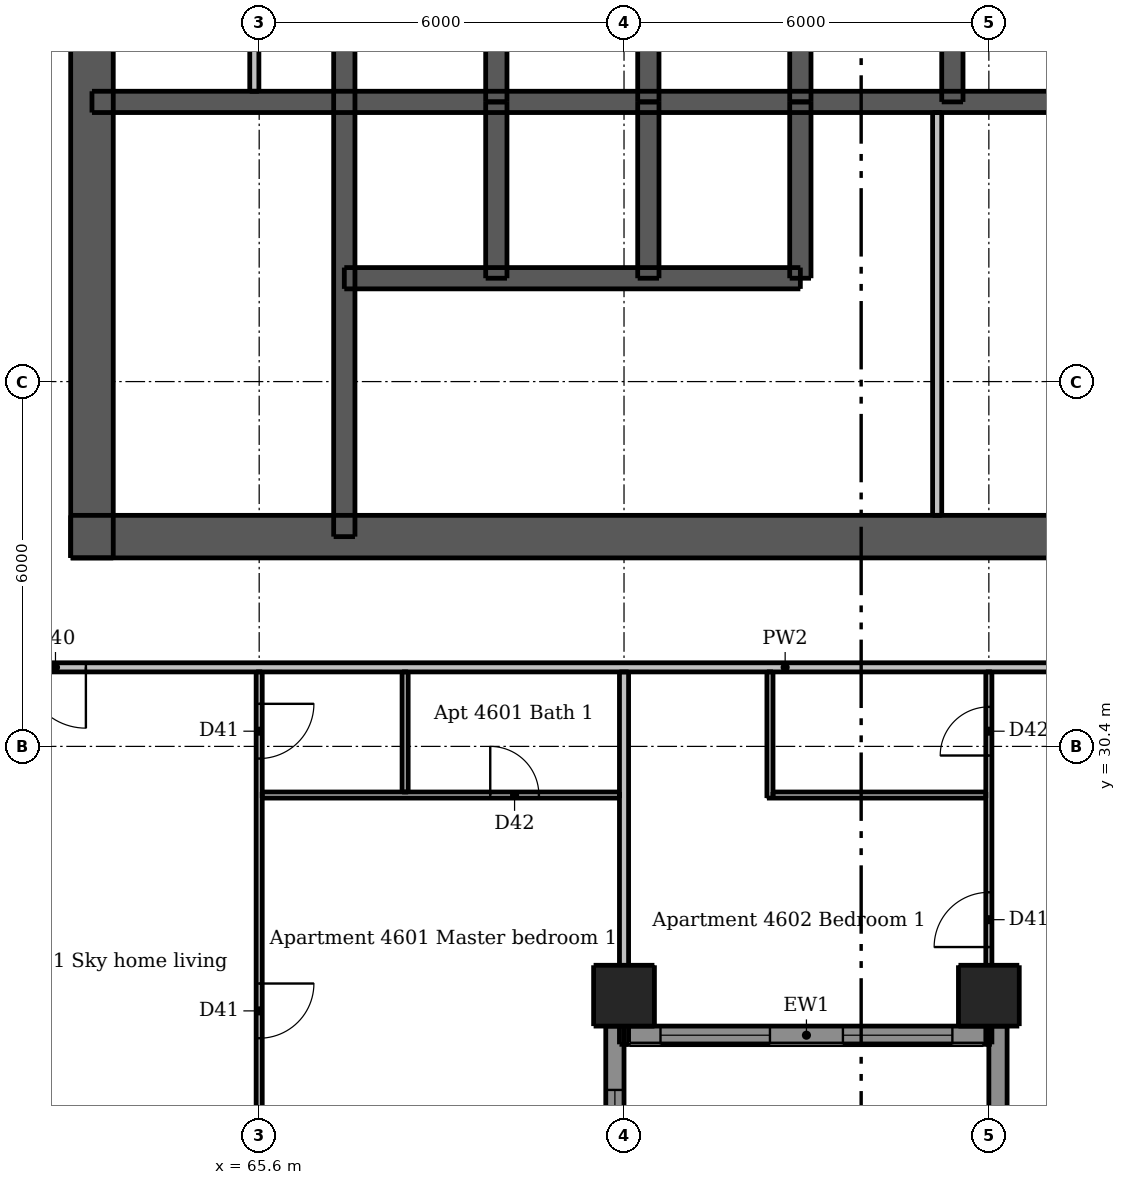
"""IFC4 building model, lengths in metres.
Left out: names, types, materials, properties, quantities, classifications, styles, units other than length and angle.
Written with IfcOpenShell. Run it as: python <this file> out.ifc"""

import sys

from ifc_helpers import new_model, si_unit, direction, frame, frame_2d, origin, origin_2d, place, context, subcontext, project, spatial, rectangle, extrude, element, fill, save


model = new_model("IFC4")
c1 = context("Model", 3, precision=1e-05, world=origin(), true_north=direction((0.0, 1.0)))
c2 = subcontext(c1, "Body", "Model", "MODEL_VIEW")
j1 = project(units=[si_unit("LENGTHUNIT", "METRE"), si_unit("PLANEANGLEUNIT", "RADIAN")], contexts=[c1])
p1 = place(None, origin())
s1 = spatial("IfcSite", under=j1, at=p1, CompositionType="ELEMENT")
p2 = place(p1, origin())
s2 = spatial("IfcBuilding", under=s1, at=p2, CompositionType="ELEMENT")
p3 = place(p2, frame((0.0, 0.0, 171.4)))
s3 = spatial("IfcBuildingStorey", under=s2, at=p3, CompositionType="ELEMENT", Elevation=171.4)
p4 = place(p3, frame((62.5, 33.85, 0.0), z_axis=(0.0, 0.0, 1.0), x_axis=(1.0, 0.0, 0.0)))
e1 = element("IfcWall", 1, at=p4, inside=s3, PredefinedType="SHEAR", context=c2, shape_type="SweptSolid", body=[
    extrude(rectangle(XDim=24.0, YDim=0.7, at=frame_2d((12.0, 0.0))), origin(), (0.0, 0.0, 1.0), 3.05),
])
p5 = place(p4, frame((1.962, 0.0, 0.0)))
e2 = element("IfcOpeningElement", 2, at=p5, cuts=e1, PredefinedType="OPENING", context=c2, shape_type="SweptSolid", body=[
    extrude(rectangle(XDim=1.1, YDim=2.1, at=frame_2d((0.55, 1.05))), frame((0.0, 0.36, 0.0), z_axis=(0.0, -1.0, 0.0), x_axis=(1.0, 0.0, 0.0)), (0.0, 0.0, 1.0), 0.72),
])
p6 = place(p4, frame((20.938, 0.0, 0.0)))
e3 = element("IfcOpeningElement", 3, at=p6, cuts=e1, PredefinedType="OPENING", context=c2, shape_type="SweptSolid", body=[
    extrude(rectangle(XDim=1.1, YDim=2.1, at=frame_2d((0.55, 1.05))), frame((0.0, 0.36, 0.0), z_axis=(0.0, -1.0, 0.0), x_axis=(1.0, 0.0, 0.0)), (0.0, 0.0, 1.0), 0.72),
])
p7 = place(p4, frame((8.0, 0.0, 0.0)))
e4 = element("IfcOpeningElement", 4, at=p7, cuts=e1, PredefinedType="OPENING", context=c2, shape_type="SweptSolid", body=[
    extrude(rectangle(XDim=1.1, YDim=2.1, at=frame_2d((0.55, 1.05))), frame((0.0, 0.36, 0.0), z_axis=(0.0, -1.0, 0.0), x_axis=(1.0, 0.0, 0.0)), (0.0, 0.0, 1.0), 0.72),
])
p8 = place(p4, frame((16.375, 0.0, 0.0)))
e5 = element("IfcOpeningElement", 5, at=p8, cuts=e1, PredefinedType="OPENING", context=c2, shape_type="SweptSolid", body=[
    extrude(rectangle(XDim=0.9, YDim=2.1, at=frame_2d((0.45, 1.05))), frame((0.0, 0.36, 0.0), z_axis=(0.0, -1.0, 0.0), x_axis=(1.0, 0.0, 0.0)), (0.0, 0.0, 1.0), 0.72),
])
p9 = place(p3, frame((62.85, 33.5, 0.0), z_axis=(0.0, 0.0, 1.0), x_axis=(0.0, 1.0, 0.0)))
e6 = element("IfcWall", 6, at=p9, inside=s3, PredefinedType="SHEAR", context=c2, shape_type="SweptSolid", body=[
    extrude(rectangle(XDim=24.0, YDim=0.7, at=frame_2d((12.0, 0.0))), origin(), (0.0, 0.0, 1.0), 3.05),
])
p10 = place(p9, frame((11.2, 0.0, 0.0)))
e7 = element("IfcOpeningElement", 7, at=p10, cuts=e6, PredefinedType="OPENING", context=c2, shape_type="SweptSolid", body=[
    extrude(rectangle(XDim=1.6, YDim=2.1, at=frame_2d((0.8, 1.05))), frame((0.0, 0.36, 0.0), z_axis=(0.0, -1.0, 0.0), x_axis=(1.0, 0.0, 0.0)), (0.0, 0.0, 1.0), 0.72),
])
p11 = place(p3, frame((62.85, 41.0, 0.0), z_axis=(0.0, 0.0, 1.0), x_axis=(1.0, 0.0, 0.0)))
e8 = element("IfcWall", 8, at=p11, inside=s3, PredefinedType="SHEAR", context=c2, shape_type="SweptSolid", body=[
    extrude(rectangle(XDim=23.3, YDim=0.35, at=frame_2d((11.65, 0.0))), origin(), (0.0, 0.0, 1.0), 3.05),
])
p12 = place(p3, frame((67.0, 33.85, 0.0), z_axis=(0.0, 0.0, 1.0), x_axis=(0.0, 1.0, 0.0)))
e9 = element("IfcWall", 9, at=p12, inside=s3, PredefinedType="SHEAR", context=c2, shape_type="SweptSolid", body=[
    extrude(rectangle(XDim=10.05, YDim=0.35, at=frame_2d((5.025, 0.0))), origin(), (0.0, 0.0, 1.0), 3.05),
])
p13 = place(p12, frame((0.55, 0.0, 0.0)))
e10 = element("IfcOpeningElement", 10, at=p13, cuts=e9, PredefinedType="OPENING", context=c2, shape_type="SweptSolid", body=[
    extrude(rectangle(XDim=1.1, YDim=2.1, at=frame_2d((0.55, 1.05))), frame((0.0, 0.185, 0.0), z_axis=(0.0, -1.0, 0.0), x_axis=(1.0, 0.0, 0.0)), (0.0, 0.0, 1.0), 0.37),
])
for number, where, z_axis, x_axis in (
    (11, (69.5, 41.0, 0.0), (0.0, 0.0, 1.0), (0.0, 1.0, 0.0)),
    (12, (72.0, 41.0, 0.0), (0.0, 0.0, 1.0), (0.0, 1.0, 0.0)),
    (13, (74.5, 41.0, 0.0), (0.0, 0.0, 1.0), (0.0, 1.0, 0.0)),
    (14, (77.0, 41.0, 0.0), (0.0, 0.0, 1.0), (0.0, 1.0, 0.0)),
):
    element("IfcWall", number, at=place(p3, frame(where, z_axis=z_axis, x_axis=x_axis)), inside=s3, PredefinedType="SHEAR", context=c2, shape_type="SweptSolid", body=[
        extrude(rectangle(XDim=2.9, YDim=0.35, at=frame_2d((1.45, 0.0))), origin(), (0.0, 0.0, 1.0), 3.05),
    ])
p14 = place(p3, frame((67.0, 38.1, 0.0), z_axis=(0.0, 0.0, 1.0), x_axis=(1.0, 0.0, 0.0)))
e15 = element("IfcWall", 15, at=p14, inside=s3, PredefinedType="SHEAR", context=c2, shape_type="SweptSolid", body=[
    extrude(rectangle(XDim=7.5, YDim=0.35, at=frame_2d((3.75, 0.0))), origin(), (0.0, 0.0, 1.0), 3.05),
])
p15 = place(p14, frame((0.7, 0.0, 0.0)))
e16 = element("IfcOpeningElement", 16, at=p15, cuts=e15, PredefinedType="OPENING", context=c2, shape_type="SweptSolid", body=[
    extrude(rectangle(XDim=1.1, YDim=2.1, at=frame_2d((0.55, 1.05))), frame((0.0, 0.185, 0.0), z_axis=(0.0, -1.0, 0.0), x_axis=(1.0, 0.0, 0.0)), (0.0, 0.0, 1.0), 0.37),
])
p16 = place(p14, frame((3.2, 0.0, 0.0)))
e17 = element("IfcOpeningElement", 17, at=p16, cuts=e15, PredefinedType="OPENING", context=c2, shape_type="SweptSolid", body=[
    extrude(rectangle(XDim=1.1, YDim=2.1, at=frame_2d((0.55, 1.05))), frame((0.0, 0.185, 0.0), z_axis=(0.0, -1.0, 0.0), x_axis=(1.0, 0.0, 0.0)), (0.0, 0.0, 1.0), 0.37),
])
p17 = place(p14, frame((5.65, 0.0, 0.0)))
e18 = element("IfcOpeningElement", 18, at=p17, cuts=e15, PredefinedType="OPENING", context=c2, shape_type="SweptSolid", body=[
    extrude(rectangle(XDim=1.2, YDim=2.1, at=frame_2d((0.6, 1.05))), frame((0.0, 0.185, 0.0), z_axis=(0.0, -1.0, 0.0), x_axis=(1.0, 0.0, 0.0)), (0.0, 0.0, 1.0), 0.37),
])
for number, where, z_axis, x_axis in (
    (19, (69.5, 38.1, 0.0), (0.0, 0.0, 1.0), (0.0, 1.0, 0.0)),
    (20, (72.0, 38.1, 0.0), (0.0, 0.0, 1.0), (0.0, 1.0, 0.0)),
    (21, (74.5, 38.1, 0.0), (0.0, 0.0, 1.0), (0.0, 1.0, 0.0)),
):
    element("IfcWall", number, at=place(p3, frame(where, z_axis=z_axis, x_axis=x_axis)), inside=s3, PredefinedType="SHEAR", context=c2, shape_type="SweptSolid", body=[
        extrude(rectangle(XDim=2.9, YDim=0.35, at=frame_2d((1.45, 0.0))), origin(), (0.0, 0.0, 1.0), 3.05),
    ])
for number, where, z_axis, x_axis in (
    (22, (71.6, 26.3, 0.0), (0.0, 0.0, 1.0), (1.0, 0.0, 0.0)),
    (23, (77.6, 26.3, 0.0), (0.0, 0.0, 1.0), (1.0, 0.0, 0.0)),
):
    element("IfcColumn", number, at=place(p3, frame(where, z_axis=z_axis, x_axis=x_axis)), inside=s3, PredefinedType="COLUMN", context=c2, shape_type="SweptSolid", body=[
        extrude(rectangle(XDim=1.0, YDim=1.0, at=origin_2d()), origin(), (0.0, 0.0, 1.0), 3.05),
    ])
p18 = place(p3, frame((71.45, 22.5, 0.0), z_axis=(0.0, 0.0, 1.0), x_axis=(0.0, 1.0, 0.0)))
e24 = element("IfcWall", 24, at=p18, inside=s3, PredefinedType="SOLIDWALL", context=c2, shape_type="SweptSolid", body=[
    extrude(rectangle(XDim=3.3, YDim=0.3, at=frame_2d((1.65, 0.0))), origin(), (0.0, 0.0, 1.0), 3.05),
])
p19 = place(p18, frame((0.75, 0.0, 0.9)))
e25 = element("IfcOpeningElement", 25, at=p19, cuts=e24, PredefinedType="OPENING", context=c2, shape_type="SweptSolid", body=[
    extrude(rectangle(XDim=1.5, YDim=1.5, at=frame_2d((0.75, 0.75))), frame((0.0, 0.16, 0.0), z_axis=(0.0, -1.0, 0.0), x_axis=(1.0, 0.0, 0.0)), (0.0, 0.0, 1.0), 0.32),
])
p20 = place(p3, frame((77.75, 25.8, 0.0), z_axis=(0.0, 0.0, 1.0), x_axis=(0.0, -1.0, 0.0)))
e26 = element("IfcWall", 26, at=p20, inside=s3, PredefinedType="SOLIDWALL", context=c2, shape_type="SweptSolid", body=[
    extrude(rectangle(XDim=1.8, YDim=0.3, at=frame_2d((0.9, 0.0))), origin(), (0.0, 0.0, 1.0), 3.05),
])
p21 = place(p3, frame((71.6, 25.65, 0.0), z_axis=(0.0, 0.0, 1.0), x_axis=(1.0, 0.0, 0.0)))
e27 = element("IfcWall", 27, at=p21, inside=s3, PredefinedType="SOLIDWALL", context=c2, shape_type="SweptSolid", body=[
    extrude(rectangle(XDim=6.0, YDim=0.3, at=frame_2d((3.0, 0.0))), origin(), (0.0, 0.0, 1.0), 3.05),
])
p22 = place(p21, frame((0.6, 0.0, 0.15)))
e28 = element("IfcOpeningElement", 28, at=p22, cuts=e27, PredefinedType="OPENING", context=c2, shape_type="SweptSolid", body=[
    extrude(rectangle(XDim=1.8, YDim=2.1, at=frame_2d((0.9, 1.05))), frame((0.0, 0.16, 0.0), z_axis=(0.0, -1.0, 0.0), x_axis=(1.0, 0.0, 0.0)), (0.0, 0.0, 1.0), 0.32),
])
p23 = place(p21, frame((3.6, 0.0, 0.15)))
e29 = element("IfcOpeningElement", 29, at=p23, cuts=e27, PredefinedType="OPENING", context=c2, shape_type="SweptSolid", body=[
    extrude(rectangle(XDim=1.8, YDim=2.1, at=frame_2d((0.9, 1.05))), frame((0.0, 0.16, 0.0), z_axis=(0.0, -1.0, 0.0), x_axis=(1.0, 0.0, 0.0)), (0.0, 0.0, 1.0), 0.32),
])
p24 = place(p3, frame((76.75, 34.2, 0.0), z_axis=(0.0, 0.0, 1.0), x_axis=(0.0, 1.0, 0.0)))
e30 = element("IfcWall", 30, at=p24, inside=s3, PredefinedType="PLUMBINGWALL", context=c2, shape_type="SweptSolid", body=[
    extrude(rectangle(XDim=6.625, YDim=0.15, at=frame_2d((3.312, 0.0))), origin(), (0.0, 0.0, 1.0), 3.05),
])
p25 = place(p3, frame((65.52, 41.175, 0.0), z_axis=(0.0, 0.0, 1.0), x_axis=(0.0, 1.0, 0.0)))
e31 = element("IfcWall", 31, at=p25, inside=s3, PredefinedType="PLUMBINGWALL", context=c2, shape_type="SweptSolid", body=[
    extrude(rectangle(XDim=2.55, YDim=0.15, at=frame_2d((1.275, 0.0))), origin(), (0.0, 0.0, 1.0), 3.05),
])
p26 = place(p3, frame((65.6, 31.625, 0.0), z_axis=(0.0, 0.0, 1.0), x_axis=(0.0, -1.0, 0.0)))
e32 = element("IfcWall", 32, at=p26, inside=s3, PredefinedType="PARTITIONING", context=c2, shape_type="SweptSolid", body=[
    extrude(rectangle(XDim=9.125, YDim=0.1, at=frame_2d((4.562, 0.0))), origin(), (0.0, 0.0, 1.0), 2.516),
])
p27 = place(p26, frame((0.525, 0.0, 0.0)))
e33 = element("IfcOpeningElement", 33, at=p27, cuts=e32, PredefinedType="OPENING", context=c2, shape_type="SweptSolid", body=[
    extrude(rectangle(XDim=0.9, YDim=2.1, at=frame_2d((0.45, 1.05))), frame((0.0, 0.06, 0.0), z_axis=(0.0, -1.0, 0.0), x_axis=(1.0, 0.0, 0.0)), (0.0, 0.0, 1.0), 0.12),
])
p28 = place(p26, frame((5.125, 0.0, 0.0)))
e34 = element("IfcOpeningElement", 34, at=p28, cuts=e32, PredefinedType="OPENING", context=c2, shape_type="SweptSolid", body=[
    extrude(rectangle(XDim=0.9, YDim=2.1, at=frame_2d((0.45, 1.05))), frame((0.0, 0.06, 0.0), z_axis=(0.0, -1.0, 0.0), x_axis=(1.0, 0.0, 0.0)), (0.0, 0.0, 1.0), 0.12),
])
p29 = place(p3, frame((68.0, 29.65, 0.0), z_axis=(0.0, 0.0, 1.0), x_axis=(0.0, 1.0, 0.0)))
e35 = element("IfcWall", 35, at=p29, inside=s3, PredefinedType="PARTITIONING", context=c2, shape_type="SweptSolid", body=[
    extrude(rectangle(XDim=1.975, YDim=0.1, at=frame_2d((0.988, 0.0))), origin(), (0.0, 0.0, 1.0), 3.05),
])
p30 = place(p3, frame((74.0, 29.55, 0.0), z_axis=(0.0, 0.0, 1.0), x_axis=(0.0, 1.0, 0.0)))
e36 = element("IfcWall", 36, at=p30, inside=s3, PredefinedType="PARTITIONING", context=c2, shape_type="SweptSolid", body=[
    extrude(rectangle(XDim=2.075, YDim=0.1, at=frame_2d((1.038, 0.0))), origin(), (0.0, 0.0, 1.0), 3.05),
])
p31 = place(p3, frame((77.6, 25.5, 0.0), z_axis=(0.0, 0.0, 1.0), x_axis=(0.0, 1.0, 0.0)))
e37 = element("IfcWall", 37, at=p31, inside=s3, PredefinedType="PARTITIONING", context=c2, shape_type="SweptSolid", body=[
    extrude(rectangle(XDim=6.125, YDim=0.1, at=frame_2d((3.062, 0.0))), origin(), (0.0, 0.0, 1.0), 2.59),
])
p32 = place(p31, frame((1.6, 0.0, 0.0)))
e38 = element("IfcOpeningElement", 38, at=p32, cuts=e37, PredefinedType="OPENING", context=c2, shape_type="SweptSolid", body=[
    extrude(rectangle(XDim=0.9, YDim=2.1, at=frame_2d((0.45, 1.05))), frame((0.0, 0.06, 0.0), z_axis=(0.0, -1.0, 0.0), x_axis=(1.0, 0.0, 0.0)), (0.0, 0.0, 1.0), 0.12),
])
p33 = place(p31, frame((4.75, 0.0, 0.0)))
e39 = element("IfcOpeningElement", 39, at=p33, cuts=e37, PredefinedType="OPENING", context=c2, shape_type="SweptSolid", body=[
    extrude(rectangle(XDim=0.8, YDim=2.1, at=frame_2d((0.4, 1.05))), frame((0.0, 0.06, 0.0), z_axis=(0.0, -1.0, 0.0), x_axis=(1.0, 0.0, 0.0)), (0.0, 0.0, 1.0), 0.12),
])
p34 = place(p3, frame((65.65, 29.6, 0.0), z_axis=(0.0, 0.0, 1.0), x_axis=(1.0, 0.0, 0.0)))
e40 = element("IfcWall", 40, at=p34, inside=s3, PredefinedType="PARTITIONING", context=c2, shape_type="SweptSolid", body=[
    extrude(rectangle(XDim=5.875, YDim=0.1, at=frame_2d((2.938, 0.0))), origin(), (0.0, 0.0, 1.0), 3.05),
])
p35 = place(p34, frame((3.75, 0.0, 0.0)))
e41 = element("IfcOpeningElement", 41, at=p35, cuts=e40, PredefinedType="OPENING", context=c2, shape_type="SweptSolid", body=[
    extrude(rectangle(XDim=0.8, YDim=2.1, at=frame_2d((0.4, 1.05))), frame((0.0, 0.06, 0.0), z_axis=(0.0, -1.0, 0.0), x_axis=(1.0, 0.0, 0.0)), (0.0, 0.0, 1.0), 0.12),
])
p36 = place(p3, frame((74.05, 29.6, 0.0), z_axis=(0.0, 0.0, 1.0), x_axis=(1.0, 0.0, 0.0)))
e42 = element("IfcWall", 42, at=p36, inside=s3, PredefinedType="PARTITIONING", context=c2, shape_type="SweptSolid", body=[
    extrude(rectangle(XDim=3.5, YDim=0.1, at=frame_2d((1.75, 0.0))), origin(), (0.0, 0.0, 1.0), 3.05),
])
p37 = place(p3, frame((71.6, 25.5, 0.0), z_axis=(0.0, 0.0, 1.0), x_axis=(0.0, 1.0, 0.0)))
e43 = element("IfcWall", 43, at=p37, inside=s3, PredefinedType="PARTITIONING", context=c2, shape_type="SweptSolid", body=[
    extrude(rectangle(XDim=6.125, YDim=0.15, at=frame_2d((3.062, 0.0))), origin(), (0.0, 0.0, 1.0), 2.59),
])
p38 = place(p3, frame((89.525, 31.7, 0.0), z_axis=(0.0, 0.0, 1.0), x_axis=(-1.0, 0.0, 0.0)))
e44 = element("IfcWall", 44, at=p38, inside=s3, PredefinedType="PARTITIONING", context=c2, shape_type="SweptSolid", body=[
    extrude(rectangle(XDim=30.55, YDim=0.15, at=frame_2d((15.275, 0.0))), origin(), (0.0, 0.0, 1.0), 3.05),
])
p39 = place(p38, frame((26.775, 0.0, 0.0)))
e45 = element("IfcOpeningElement", 45, at=p39, cuts=e44, PredefinedType="OPENING", context=c2, shape_type="SweptSolid", body=[
    extrude(rectangle(XDim=1.0, YDim=2.1, at=frame_2d((0.5, 1.05))), frame((0.0, 0.085, 0.0), z_axis=(0.0, -1.0, 0.0), x_axis=(1.0, 0.0, 0.0)), (0.0, 0.0, 1.0), 0.17),
])
p40 = place(p38, frame((8.425, 0.0, 0.0)))
e46 = element("IfcOpeningElement", 46, at=p40, cuts=e44, PredefinedType="OPENING", context=c2, shape_type="SweptSolid", body=[
    extrude(rectangle(XDim=1.0, YDim=2.1, at=frame_2d((0.5, 1.05))), frame((0.0, 0.085, 0.0), z_axis=(0.0, -1.0, 0.0), x_axis=(1.0, 0.0, 0.0)), (0.0, 0.0, 1.0), 0.17),
])
p41 = place(p19, origin())
e47 = element("IfcWindow", 47, at=p41, inside=s3, PartitioningType="DOUBLE_PANEL_VERTICAL", PredefinedType="WINDOW", context=c2, shape_type="SweptSolid", body=[
    extrude(rectangle(XDim=1.5, YDim=1.5, at=frame_2d((0.75, 0.75))), frame((0.0, 0.03, 0.0), z_axis=(0.0, -1.0, 0.0), x_axis=(1.0, 0.0, 0.0)), (0.0, 0.0, 1.0), 0.06),
])
fill(e25, e47)
p42 = place(p22, origin())
e48 = element("IfcWindow", 48, at=p42, inside=s3, PartitioningType="DOUBLE_PANEL_VERTICAL", PredefinedType="WINDOW", context=c2, shape_type="SweptSolid", body=[
    extrude(rectangle(XDim=1.8, YDim=2.1, at=frame_2d((0.9, 1.05))), frame((0.0, 0.03, 0.0), z_axis=(0.0, -1.0, 0.0), x_axis=(1.0, 0.0, 0.0)), (0.0, 0.0, 1.0), 0.06),
])
fill(e28, e48)
p43 = place(p23, origin())
e49 = element("IfcWindow", 49, at=p43, inside=s3, PartitioningType="DOUBLE_PANEL_VERTICAL", PredefinedType="WINDOW", context=c2, shape_type="SweptSolid", body=[
    extrude(rectangle(XDim=1.8, YDim=2.1, at=frame_2d((0.9, 1.05))), frame((0.0, 0.03, 0.0), z_axis=(0.0, -1.0, 0.0), x_axis=(1.0, 0.0, 0.0)), (0.0, 0.0, 1.0), 0.06),
])
fill(e29, e49)
p44 = place(p5, origin())
e50 = element("IfcDoor", 50, at=p44, inside=s3, OperationType="SINGLE_SWING_LEFT", PredefinedType="DOOR", context=c2, shape_type="SweptSolid", body=[
    extrude(rectangle(XDim=1.1, YDim=2.1, at=frame_2d((0.55, 1.05))), frame((0.0, 0.337, 0.0), z_axis=(0.0, -1.0, 0.0), x_axis=(1.0, 0.0, 0.0)), (0.0, 0.0, 1.0), 0.05),
])
fill(e2, e50)
p45 = place(p7, origin())
e51 = element("IfcDoor", 51, at=p45, inside=s3, OperationType="SINGLE_SWING_LEFT", PredefinedType="DOOR", context=c2, shape_type="SweptSolid", body=[
    extrude(rectangle(XDim=1.1, YDim=2.1, at=frame_2d((0.55, 1.05))), frame((0.0, 0.337, 0.0), z_axis=(0.0, -1.0, 0.0), x_axis=(1.0, 0.0, 0.0)), (0.0, 0.0, 1.0), 0.05),
])
fill(e4, e51)
p46 = place(p13, origin())
e52 = element("IfcDoor", 52, at=p46, inside=s3, OperationType="SINGLE_SWING_RIGHT", PredefinedType="DOOR", context=c2, shape_type="SweptSolid", body=[
    extrude(rectangle(XDim=1.1, YDim=2.1, at=frame_2d((0.55, 1.05))), frame((0.0, -0.112, 0.0), z_axis=(0.0, -1.0, 0.0), x_axis=(1.0, 0.0, 0.0)), (0.0, 0.0, 1.0), 0.05),
])
fill(e10, e52)
p47 = place(p15, origin())
e53 = element("IfcDoor", 53, at=p47, inside=s3, OperationType="DOUBLE_DOOR_SLIDING", PredefinedType="DOOR", context=c2, shape_type="SweptSolid", body=[
    extrude(rectangle(XDim=1.1, YDim=2.1, at=frame_2d((0.55, 1.05))), frame((0.0, 0.025, 0.0), z_axis=(0.0, -1.0, 0.0), x_axis=(1.0, 0.0, 0.0)), (0.0, 0.0, 1.0), 0.05),
])
fill(e16, e53)
p48 = place(p16, origin())
e54 = element("IfcDoor", 54, at=p48, inside=s3, OperationType="DOUBLE_DOOR_SLIDING", PredefinedType="DOOR", context=c2, shape_type="SweptSolid", body=[
    extrude(rectangle(XDim=1.1, YDim=2.1, at=frame_2d((0.55, 1.05))), frame((0.0, 0.025, 0.0), z_axis=(0.0, -1.0, 0.0), x_axis=(1.0, 0.0, 0.0)), (0.0, 0.0, 1.0), 0.05),
])
fill(e17, e54)
p49 = place(p17, origin())
e55 = element("IfcDoor", 55, at=p49, inside=s3, OperationType="DOUBLE_DOOR_SLIDING", PredefinedType="DOOR", context=c2, shape_type="SweptSolid", body=[
    extrude(rectangle(XDim=1.2, YDim=2.1, at=frame_2d((0.6, 1.05))), frame((0.0, 0.025, 0.0), z_axis=(0.0, -1.0, 0.0), x_axis=(1.0, 0.0, 0.0)), (0.0, 0.0, 1.0), 0.05),
])
fill(e18, e55)
p50 = place(p39, origin())
e56 = element("IfcDoor", 56, at=p50, inside=s3, OperationType="SINGLE_SWING_LEFT", PredefinedType="DOOR", context=c2, shape_type="SweptSolid", body=[
    extrude(rectangle(XDim=1.0, YDim=2.1, at=frame_2d((0.5, 1.05))), frame((0.0, 0.025, 0.0), z_axis=(0.0, -1.0, 0.0), x_axis=(1.0, 0.0, 0.0)), (0.0, 0.0, 1.0), 0.05),
])
fill(e45, e56)
p51 = place(p27, origin())
e57 = element("IfcDoor", 57, at=p51, inside=s3, OperationType="SINGLE_SWING_LEFT", PredefinedType="DOOR", context=c2, shape_type="SweptSolid", body=[
    extrude(rectangle(XDim=0.9, YDim=2.1, at=frame_2d((0.45, 1.05))), frame((0.0, 0.025, 0.0), z_axis=(0.0, -1.0, 0.0), x_axis=(1.0, 0.0, 0.0)), (0.0, 0.0, 1.0), 0.05),
])
fill(e33, e57)
p52 = place(p28, origin())
e58 = element("IfcDoor", 58, at=p52, inside=s3, OperationType="SINGLE_SWING_LEFT", PredefinedType="DOOR", context=c2, shape_type="SweptSolid", body=[
    extrude(rectangle(XDim=0.9, YDim=2.1, at=frame_2d((0.45, 1.05))), frame((0.0, 0.025, 0.0), z_axis=(0.0, -1.0, 0.0), x_axis=(1.0, 0.0, 0.0)), (0.0, 0.0, 1.0), 0.05),
])
fill(e34, e58)
p53 = place(p35, origin())
e59 = element("IfcDoor", 59, at=p53, inside=s3, OperationType="SINGLE_SWING_LEFT", PredefinedType="DOOR", context=c2, shape_type="SweptSolid", body=[
    extrude(rectangle(XDim=0.8, YDim=2.1, at=frame_2d((0.4, 1.05))), frame((0.0, 0.025, 0.0), z_axis=(0.0, -1.0, 0.0), x_axis=(1.0, 0.0, 0.0)), (0.0, 0.0, 1.0), 0.05),
])
fill(e41, e59)
p54 = place(p32, origin())
e60 = element("IfcDoor", 60, at=p54, inside=s3, OperationType="SINGLE_SWING_LEFT", PredefinedType="DOOR", context=c2, shape_type="SweptSolid", body=[
    extrude(rectangle(XDim=0.9, YDim=2.1, at=frame_2d((0.45, 1.05))), frame((0.0, 0.025, 0.0), z_axis=(0.0, -1.0, 0.0), x_axis=(1.0, 0.0, 0.0)), (0.0, 0.0, 1.0), 0.05),
])
fill(e38, e60)
p55 = place(p33, origin())
e61 = element("IfcDoor", 61, at=p55, inside=s3, OperationType="SINGLE_SWING_LEFT", PredefinedType="DOOR", context=c2, shape_type="SweptSolid", body=[
    extrude(rectangle(XDim=0.8, YDim=2.1, at=frame_2d((0.4, 1.05))), frame((0.0, 0.025, 0.0), z_axis=(0.0, -1.0, 0.0), x_axis=(1.0, 0.0, 0.0)), (0.0, 0.0, 1.0), 0.05),
])
fill(e39, e61)
save(model, sys.argv[1])
